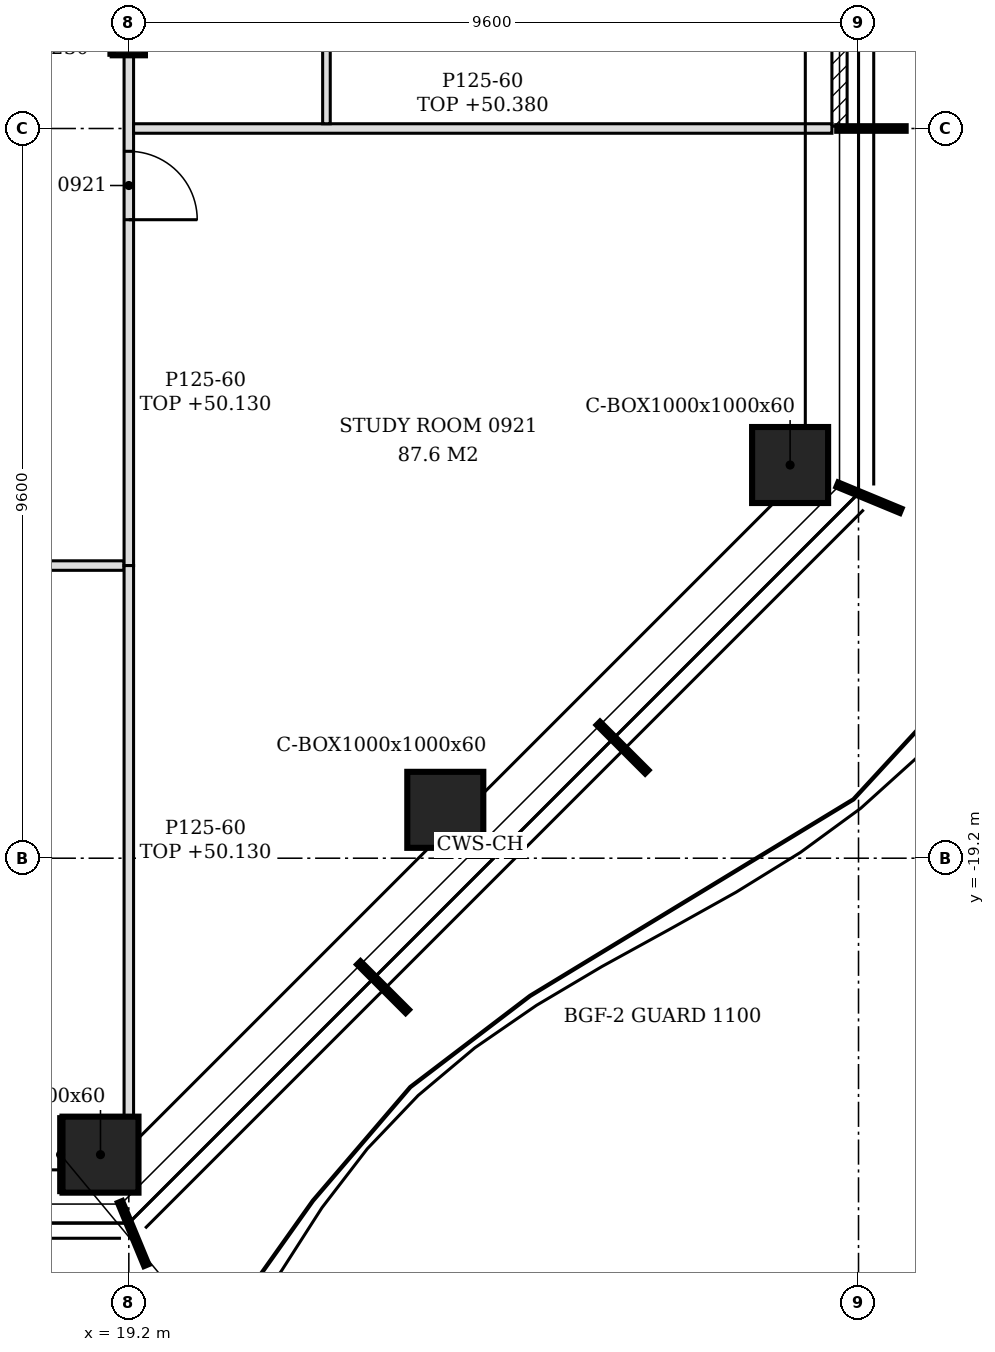
"""IFC4 building model, lengths in metres.
Left out: names, types, materials, properties, quantities, classifications, styles, units other than length and angle.
Written with IfcOpenShell. Run it as: python <this file> out.ifc"""

import sys

from ifc_helpers import new_model, si_unit, direction, frame, frame_2d, origin, origin_2d, place, context, subcontext, project, spatial, polyline, rectangle, hollow_rectangle, i_section, outline, extrude, element, fill, save


model = new_model("IFC4")
c1 = context("Model", 3, precision=1e-05, world=origin(), true_north=direction((0.0, 1.0)))
c2 = subcontext(c1, "Body", "Model", "MODEL_VIEW")
j1 = project(units=[si_unit("LENGTHUNIT", "METRE"), si_unit("PLANEANGLEUNIT", "RADIAN")], contexts=[c1])
p1 = place(None, origin())
s1 = spatial("IfcSite", under=j1, at=p1, CompositionType="ELEMENT")
p2 = place(p1, origin())
s2 = spatial("IfcBuilding", under=s1, at=p2, CompositionType="ELEMENT")
p3 = place(p2, frame((0.0, 0.0, 47.4)))
s3 = spatial("IfcBuildingStorey", under=s2, at=p3, CompositionType="ELEMENT", Elevation=47.4)
for number, where, z_axis, x_axis in (
    (1, (18.827, -23.1, -0.15), (0.0, 0.0, 1.0), (1.0, 0.0, 0.0)),
    (2, (23.364, -18.564, -0.15), (0.0, 0.0, 1.0), (1.0, 0.0, 0.0)),
    (3, (27.9, -14.027, -0.15), (0.0, 0.0, 1.0), (1.0, 0.0, 0.0)),
):
    element("IfcColumn", number, at=place(p3, frame(where, z_axis=z_axis, x_axis=x_axis)), inside=s3, PredefinedType="COLUMN", context=c2, shape_type="SweptSolid", body=[
        extrude(hollow_rectangle(XDim=1.0, YDim=1.0, WallThickness=0.06, at=origin_2d()), origin(), (0.0, 0.0, 1.0), 3.6),
    ])
p4 = place(p3, frame((19.2, -8.4, -0.15), z_axis=(0.0, 0.0, 1.0), x_axis=(1.0, 0.0, 0.0)))
e4 = element("IfcColumn", 4, at=p4, inside=s3, PredefinedType="COLUMN", context=c2, shape_type="SweptSolid", body=[
    extrude(i_section(OverallWidth=0.424, OverallDepth=0.474, WebThickness=0.048, FlangeThickness=0.077, FilletRadius=0.015, at=origin_2d()), origin(), (0.0, 0.0, 1.0), 3.6),
])
p5 = place(p3, frame((28.55, -9.57, 0.0), z_axis=(0.0, 0.0, 1.0), x_axis=(0.0, 1.0, 0.0)))
e5 = element("IfcWall", 5, at=p5, inside=s3, PredefinedType="NOTDEFINED", context=c2, shape_type="SweptSolid", body=[
    extrude(rectangle(XDim=4.74, YDim=0.2, at=frame_2d((2.37, 0.0))), origin(), (0.0, 0.0, 1.0), 3.45),
])
p6 = place(p5, frame((1.17, 0.0, 0.0)))
e6 = element("IfcOpeningElement", 6, at=p6, cuts=e5, PredefinedType="OPENING", context=c2, shape_type="SweptSolid", body=[
    extrude(rectangle(XDim=2.4, YDim=2.4, at=frame_2d((1.2, 1.2))), frame((0.0, 0.11, 0.0), z_axis=(0.0, -1.0, 0.0), x_axis=(1.0, 0.0, 0.0)), (0.0, 0.0, 1.0), 0.22),
])
p7 = place(p3, frame((19.2, -22.6, 0.0), z_axis=(0.0, 0.0, 1.0), x_axis=(0.0, 1.0, 0.0)))
e7 = element("IfcWall", 7, at=p7, inside=s3, PredefinedType="PARTITIONING", context=c2, shape_type="SweptSolid", body=[
    extrude(outline(polyline([(0.0, 0.0), (7.25, 0.0), (7.25, 2.73), (0.43, 2.73), (0.428, 2.63), (0.0, 2.63), (0.0, 0.0)])), frame((0.0, 0.062, 0.0), z_axis=(0.0, -1.0, 0.0), x_axis=(1.0, 0.0, 0.0)), (0.0, 0.0, 1.0), 0.125),
])
p8 = place(p3, frame((-20.15, -15.35, 0.0), z_axis=(0.0, 0.0, 1.0), x_axis=(1.0, 0.0, 0.0)))
e8 = element("IfcWall", 8, at=p8, inside=s3, PredefinedType="PARTITIONING", context=c2, shape_type="SweptSolid", body=[
    extrude(outline(polyline([(0.0, 0.0), (39.287, 0.0), (39.288, 2.73), (39.2, 2.73), (39.198, 3.45), (27.5, 3.45), (27.498, 2.73), (27.2, 2.73), (27.198, 3.45), (15.5, 3.45), (15.498, 2.73), (15.2, 2.73), (15.198, 3.45), (5.9, 3.45), (5.898, 2.93), (5.6, 2.93), (5.598, 3.45), (0.0, 3.45), (0.0, 0.0)])), frame((0.0, 0.062, 0.0), z_axis=(0.0, -1.0, 0.0), x_axis=(1.0, 0.0, 0.0)), (0.0, 0.0, 1.0), 0.125),
])
p9 = place(p8, frame((4.55, 0.0, 0.0)))
e9 = element("IfcOpeningElement", 9, at=p9, cuts=e8, PredefinedType="OPENING", context=c2, shape_type="SweptSolid", body=[
    extrude(rectangle(XDim=0.9, YDim=2.1, at=frame_2d((0.45, 1.05))), frame((0.0, 0.073, 0.0), z_axis=(0.0, -1.0, 0.0), x_axis=(1.0, 0.0, 0.0)), (0.0, 0.0, 1.0), 0.145),
])
p10 = place(p8, frame((7.136, 0.0, 0.0)))
e10 = element("IfcOpeningElement", 10, at=p10, cuts=e8, PredefinedType="OPENING", context=c2, shape_type="SweptSolid", body=[
    extrude(rectangle(XDim=0.9, YDim=2.1, at=frame_2d((0.45, 1.05))), frame((0.0, 0.073, 0.0), z_axis=(0.0, -1.0, 0.0), x_axis=(1.0, 0.0, 0.0)), (0.0, 0.0, 1.0), 0.145),
])
p11 = place(p8, frame((14.15, 0.0, 0.0)))
e11 = element("IfcOpeningElement", 11, at=p11, cuts=e8, PredefinedType="OPENING", context=c2, shape_type="SweptSolid", body=[
    extrude(rectangle(XDim=0.9, YDim=2.1, at=frame_2d((0.45, 1.05))), frame((0.0, 0.073, 0.0), z_axis=(0.0, -1.0, 0.0), x_axis=(1.0, 0.0, 0.0)), (0.0, 0.0, 1.0), 0.145),
])
p12 = place(p8, frame((16.55, 0.0, 0.0)))
e12 = element("IfcOpeningElement", 12, at=p12, cuts=e8, PredefinedType="OPENING", context=c2, shape_type="SweptSolid", body=[
    extrude(rectangle(XDim=0.9, YDim=2.1, at=frame_2d((0.45, 1.05))), frame((0.0, 0.073, 0.0), z_axis=(0.0, -1.0, 0.0), x_axis=(1.0, 0.0, 0.0)), (0.0, 0.0, 1.0), 0.145),
])
p13 = place(p8, frame((21.35, 0.0, 0.0)))
e13 = element("IfcOpeningElement", 13, at=p13, cuts=e8, PredefinedType="OPENING", context=c2, shape_type="SweptSolid", body=[
    extrude(rectangle(XDim=0.9, YDim=2.1, at=frame_2d((0.45, 1.05))), frame((0.0, 0.073, 0.0), z_axis=(0.0, -1.0, 0.0), x_axis=(1.0, 0.0, 0.0)), (0.0, 0.0, 1.0), 0.145),
])
p14 = place(p8, frame((28.364, 0.0, 0.0)))
e14 = element("IfcOpeningElement", 14, at=p14, cuts=e8, PredefinedType="OPENING", context=c2, shape_type="SweptSolid", body=[
    extrude(rectangle(XDim=0.9, YDim=2.1, at=frame_2d((0.45, 1.05))), frame((0.0, 0.073, 0.0), z_axis=(0.0, -1.0, 0.0), x_axis=(1.0, 0.0, 0.0)), (0.0, 0.0, 1.0), 0.145),
])
p15 = place(p8, frame((32.35, 0.0, 0.0)))
e15 = element("IfcOpeningElement", 15, at=p15, cuts=e8, PredefinedType="OPENING", context=c2, shape_type="SweptSolid", body=[
    extrude(rectangle(XDim=0.9, YDim=2.1, at=frame_2d((0.45, 1.05))), frame((0.0, 0.073, 0.0), z_axis=(0.0, -1.0, 0.0), x_axis=(1.0, 0.0, 0.0)), (0.0, 0.0, 1.0), 0.145),
])
p16 = place(p8, frame((37.35, 0.0, 0.0)))
e16 = element("IfcOpeningElement", 16, at=p16, cuts=e8, PredefinedType="OPENING", context=c2, shape_type="SweptSolid", body=[
    extrude(rectangle(XDim=0.9, YDim=2.1, at=frame_2d((0.45, 1.05))), frame((0.0, 0.073, 0.0), z_axis=(0.0, -1.0, 0.0), x_axis=(1.0, 0.0, 0.0)), (0.0, 0.0, 1.0), 0.145),
])
p17 = place(p3, frame((19.2, -15.35, 0.0), z_axis=(0.0, 0.0, 1.0), x_axis=(0.0, 1.0, 0.0)))
e17 = element("IfcWall", 17, at=p17, inside=s3, PredefinedType="PARTITIONING", context=c2, shape_type="SweptSolid", body=[
    extrude(rectangle(XDim=6.713, YDim=0.125, at=frame_2d((3.356, 0.0))), origin(), (0.0, 0.0, 1.0), 2.73),
])
p18 = place(p17, frame((4.55, 0.0, 0.0)))
e18 = element("IfcOpeningElement", 18, at=p18, cuts=e17, PredefinedType="OPENING", context=c2, shape_type="SweptSolid", body=[
    extrude(rectangle(XDim=0.9, YDim=2.1, at=frame_2d((0.45, 1.05))), frame((0.0, 0.073, 0.0), z_axis=(0.0, -1.0, 0.0), x_axis=(1.0, 0.0, 0.0)), (0.0, 0.0, 1.0), 0.145),
])
p19 = place(p3, frame((19.262, -9.6, 0.0), z_axis=(0.0, 0.0, 1.0), x_axis=(1.0, 0.0, 0.0)))
e19 = element("IfcWall", 19, at=p19, inside=s3, PredefinedType="PARTITIONING", context=c2, shape_type="SweptSolid", body=[
    extrude(outline(polyline([(0.0, 0.0), (9.188, 0.0), (9.188, 2.98), (8.788, 2.98), (8.785, 2.93), (8.488, 2.93), (8.486, 2.98), (0.087, 2.98), (0.085, 2.73), (0.0, 2.73), (0.0, 0.0)])), frame((0.0, 0.062, 0.0), z_axis=(0.0, -1.0, 0.0), x_axis=(1.0, 0.0, 0.0)), (0.0, 0.0, 1.0), 0.125),
])
p20 = place(p3, frame((21.8, -9.538, 0.0), z_axis=(0.0, 0.0, 1.0), x_axis=(0.0, 1.0, 0.0)))
e20 = element("IfcWall", 20, at=p20, inside=s3, PredefinedType="PARTITIONING", context=c2, shape_type="SweptSolid", body=[
    extrude(outline(polyline([(0.0, 0.0), (2.288, 0.0), (2.288, 3.45), (0.032, 3.45), (0.031, 2.98), (0.0, 2.98), (0.0, 0.0)])), frame((0.0, 0.05, 0.0), z_axis=(0.0, -1.0, 0.0), x_axis=(1.0, 0.0, 0.0)), (0.0, 0.0, 1.0), 0.1),
])
p21 = place(p3, frame((18.302, -23.6, 0.0), z_axis=(0.0, 0.0, 1.0), x_axis=(0.0, 1.0, 0.0)))
e21 = element("IfcWall", 21, at=p21, inside=s3, PredefinedType="PARTITIONING", context=c2, shape_type="SweptSolid", body=[
    extrude(rectangle(XDim=1.0, YDim=0.05, at=frame_2d((0.5, 0.0))), origin(), (0.0, 0.0, 1.0), 2.93),
])
p22 = place(p3, frame((18.963, -8.637, 0.0), z_axis=(0.0, 0.0, 1.0), x_axis=(0.0, 1.0, 0.0)))
e22 = element("IfcWall", 22, at=p22, inside=s3, PredefinedType="PARTITIONING", context=c2, shape_type="SweptSolid", body=[
    extrude(rectangle(XDim=0.474, YDim=0.05, at=frame_2d((0.237, 0.0))), origin(), (0.0, 0.0, 1.0), 2.83),
])
p23 = place(p18, frame((0.9, 0.0, 0.0), z_axis=(0.0, 0.0, 1.0), x_axis=(-1.0, 0.0, 0.0)))
e23 = element("IfcDoor", 23, at=p23, inside=s3, OperationType="SINGLE_SWING_RIGHT", PredefinedType="DOOR", context=c2, shape_type="SweptSolid", body=[
    extrude(rectangle(XDim=0.9, YDim=2.1, at=frame_2d((0.45, 1.05))), frame((0.0, 0.025, 0.0), z_axis=(0.0, -1.0, 0.0), x_axis=(1.0, 0.0, 0.0)), (0.0, 0.0, 1.0), 0.05),
])
fill(e18, e23)
save(model, sys.argv[1])
